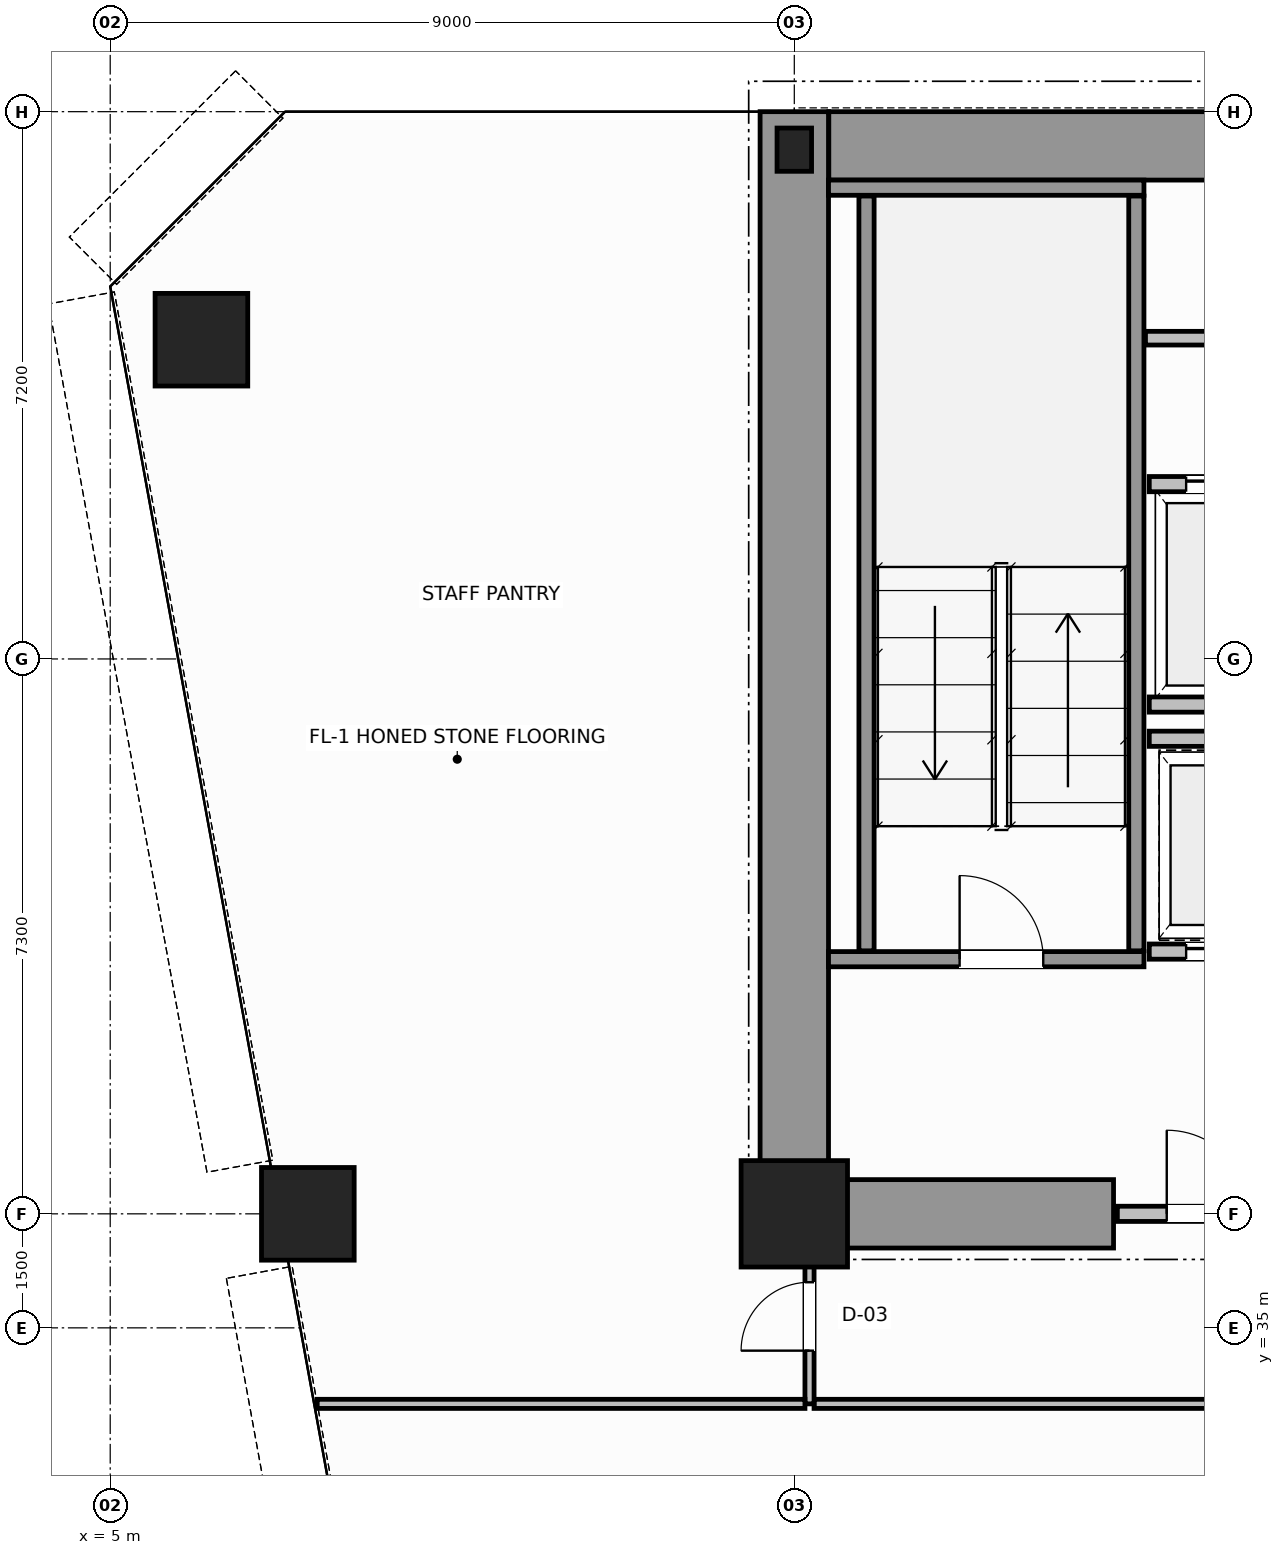
"""IFC4 building model, lengths in metres.
Left out: names, types, materials, properties, quantities, classifications, styles, units other than length and angle.
Written with IfcOpenShell. Run it as: python <this file> out.ifc"""

import sys

from ifc_helpers import new_model, si_unit, direction, frame, frame_2d, origin, origin_2d, place, context, subcontext, project, spatial, rectangle, hollow_circle, i_section, extrude, source, transform, mapped, element, fill, save


model = new_model("IFC4")
c1 = context("Model", 3, precision=1e-05, world=origin(), true_north=direction((0.0, 1.0)))
c2 = subcontext(c1, "Body", "Model", "MODEL_VIEW")
j1 = project(units=[si_unit("LENGTHUNIT", "METRE"), si_unit("PLANEANGLEUNIT", "RADIAN")], contexts=[c1])
p1 = place(None, origin())
s1 = spatial("IfcSite", under=j1, at=p1, CompositionType="ELEMENT")
p2 = place(p1, origin())
s2 = spatial("IfcBuilding", under=s1, at=p2, CompositionType="ELEMENT")
p3 = place(p2, frame((0.0, 0.0, 68.2)))
s3 = spatial("IfcBuildingStorey", under=s2, at=p3, CompositionType="ELEMENT", Elevation=68.2)
m1 = source(origin(), c2, "Body", "SweptSolid", [
    extrude(rectangle(XDim=1.4, YDim=1.4, at=origin_2d()), origin(), (0.0, 0.0, 1.0), 3.8),
])
p4 = place(p3, frame((14.0, 36.5, 0.0), z_axis=(0.0, 0.0, 1.0), x_axis=(1.0, 0.0, 0.0)))
e1 = element("IfcColumn", 1, at=p4, inside=s3, PredefinedType="COLUMN", context=c2, shape_type="MappedRepresentation", body=[
    mapped(m1, transform((0.0, 0.0, 0.0), scale=1.0)),
])
m2 = source(origin(), c2, "Body", "SweptSolid", [
    extrude(i_section(OverallWidth=0.454, OverallDepth=0.569, WebThickness=0.078, FlangeThickness=0.08, FilletRadius=0.015, at=origin_2d()), origin(), (0.0, 0.0, 1.0), 3.8),
])
p5 = place(p3, frame((14.0, 50.5, 0.0), z_axis=(0.0, 0.0, 1.0), x_axis=(1.0, 0.0, 0.0)))
e2 = element("IfcColumn", 2, at=p5, inside=s3, PredefinedType="COLUMN", context=c2, shape_type="MappedRepresentation", body=[
    mapped(m2, transform((0.0, 0.0, 0.0), scale=1.0)),
])
m3 = source(origin(), c2, "Body", "SweptSolid", [
    extrude(hollow_circle(Radius=0.61, WallThickness=0.05, at=origin_2d()), origin(), (0.0, 0.0, 1.0), 3.8),
])
for number, where, z_axis, x_axis in (
    (3, (6.2, 48.0, 0.0), (0.0, 0.0, 1.0), (1.0, 0.0, 0.0)),
    (4, (7.6, 36.5, 0.0), (0.0, 0.0, 1.0), (1.0, 0.0, 0.0)),
):
    element("IfcColumn", number, at=place(p3, frame(where, z_axis=z_axis, x_axis=x_axis)), inside=s3, PredefinedType="COLUMN", context=c2, shape_type="MappedRepresentation", body=[
        mapped(m3, transform((0.0, 0.0, 0.0), scale=1.0)),
    ])
p6 = place(p3, frame((14.454, 50.55, 0.0), z_axis=(0.0, 0.0, 1.0), x_axis=(1.0, 0.0, 0.0)))
e5 = element("IfcWall", 5, at=p6, inside=s3, PredefinedType="SHEAR", context=c2, shape_type="SweptSolid", body=[
    extrude(rectangle(XDim=19.544, YDim=0.9, at=frame_2d((9.772, 0.0))), origin(), (0.0, 0.0, 1.0), 3.8),
])
p7 = place(p3, frame((14.0, 36.5, 0.0), z_axis=(0.0, 0.0, 1.0), x_axis=(0.0, 1.0, 0.0)))
e6 = element("IfcWall", 6, at=p7, inside=s3, PredefinedType="SHEAR", context=c2, shape_type="SweptSolid", body=[
    extrude(rectangle(XDim=14.5, YDim=0.9, at=frame_2d((7.25, 0.0))), origin(), (0.0, 0.0, 1.0), 3.8),
])
p8 = place(p3, frame((14.47, 36.5, 0.0), z_axis=(0.0, 0.0, 1.0), x_axis=(1.0, 0.0, 0.0)))
e7 = element("IfcWall", 7, at=p8, inside=s3, PredefinedType="SHEAR", context=c2, shape_type="SweptSolid", body=[
    extrude(rectangle(XDim=3.73, YDim=0.9, at=frame_2d((1.865, 0.0))), origin(), (0.0, 0.0, 1.0), 2.38),
])
p9 = place(p3, frame((14.45, 39.85, 0.0), z_axis=(0.0, 0.0, 1.0), x_axis=(1.0, 0.0, 0.0)))
e8 = element("IfcWall", 8, at=p9, inside=s3, PredefinedType="SOLIDWALL", context=c2, shape_type="SweptSolid", body=[
    extrude(rectangle(XDim=4.15, YDim=0.2, at=frame_2d((2.075, 0.0))), origin(), (0.0, 0.0, 1.0), 3.8),
])
p10 = place(p9, frame((1.725, 0.0, 0.0)))
e9 = element("IfcOpeningElement", 9, at=p10, cuts=e8, PredefinedType="OPENING", context=c2, shape_type="SweptSolid", body=[
    extrude(rectangle(XDim=1.1, YDim=2.15, at=frame_2d((0.55, 1.075))), frame((0.0, 0.11, 0.0), z_axis=(0.0, -1.0, 0.0), x_axis=(1.0, 0.0, 0.0)), (0.0, 0.0, 1.0), 0.22),
])
p11 = place(p3, frame((14.45, 50.0, 0.0), z_axis=(0.0, 0.0, 1.0), x_axis=(1.0, 0.0, 0.0)))
e10 = element("IfcWall", 10, at=p11, inside=s3, PredefinedType="SOLIDWALL", context=c2, shape_type="SweptSolid", body=[
    extrude(rectangle(XDim=4.15, YDim=0.2, at=frame_2d((2.075, 0.0))), origin(), (0.0, 0.0, 1.0), 3.8),
])
for number, where, z_axis, x_axis in (
    (11, (14.95, 39.96, 0.0), (0.0, 0.0, 1.0), (0.0, 1.0, 0.0)),
    (12, (18.5, 39.96, 0.0), (0.0, 0.0, 1.0), (0.0, 1.0, 0.0)),
):
    element("IfcWall", number, at=place(p3, frame(where, z_axis=z_axis, x_axis=x_axis)), inside=s3, PredefinedType="SOLIDWALL", context=c2, shape_type="SweptSolid", body=[
        extrude(rectangle(XDim=9.93, YDim=0.2, at=frame_2d((4.965, 0.0))), origin(), (0.0, 0.0, 1.0), 3.8),
    ])
p12 = place(p3, frame((18.25, 36.5, 0.0), z_axis=(0.0, 0.0, 1.0), x_axis=(1.0, 0.0, 0.0)))
e13 = element("IfcWall", 13, at=p12, inside=s3, PredefinedType="SOLIDWALL", context=c2, shape_type="SweptSolid", body=[
    extrude(rectangle(XDim=2.47, YDim=0.2, at=frame_2d((1.235, 0.0))), origin(), (0.0, 0.0, 1.0), 2.37),
])
p13 = place(p12, frame((0.65, 0.0, 0.0)))
e14 = element("IfcOpeningElement", 14, at=p13, cuts=e13, PredefinedType="OPENING", context=c2, shape_type="SweptSolid", body=[
    extrude(rectangle(XDim=1.1, YDim=2.15, at=frame_2d((0.55, 1.075))), frame((0.0, 0.11, 0.0), z_axis=(0.0, -1.0, 0.0), x_axis=(1.0, 0.0, 0.0)), (0.0, 0.0, 1.0), 0.22),
])
p14 = place(p3, frame((18.67, 46.1, 0.0), z_axis=(0.0, 0.0, 1.0), x_axis=(1.0, 0.0, 0.0)))
e15 = element("IfcWall", 15, at=p14, inside=s3, PredefinedType="SOLIDWALL", context=c2, shape_type="SweptSolid", body=[
    extrude(rectangle(XDim=2.07, YDim=0.2, at=frame_2d((1.035, 0.0))), origin(), (0.0, 0.0, 1.0), 3.58),
])
p15 = place(p14, frame((0.485, 0.0, 0.0)))
e16 = element("IfcOpeningElement", 16, at=p15, cuts=e15, PredefinedType="OPENING", context=c2, shape_type="SweptSolid", body=[
    extrude(rectangle(XDim=1.1, YDim=2.15, at=frame_2d((0.55, 1.075))), frame((0.0, 0.11, 0.0), z_axis=(0.0, -1.0, 0.0), x_axis=(1.0, 0.0, 0.0)), (0.0, 0.0, 1.0), 0.22),
])
p16 = place(p3, frame((18.67, 43.2, 0.0), z_axis=(0.0, 0.0, 1.0), x_axis=(1.0, 0.0, 0.0)))
e17 = element("IfcWall", 17, at=p16, inside=s3, PredefinedType="SOLIDWALL", context=c2, shape_type="SweptSolid", body=[
    extrude(rectangle(XDim=2.07, YDim=0.2, at=frame_2d((1.035, 0.0))), origin(), (0.0, 0.0, 1.0), 3.58),
])
p17 = place(p3, frame((18.67, 39.95, 0.0), z_axis=(0.0, 0.0, 1.0), x_axis=(1.0, 0.0, 0.0)))
e18 = element("IfcWall", 18, at=p17, inside=s3, PredefinedType="SOLIDWALL", context=c2, shape_type="SweptSolid", body=[
    extrude(rectangle(XDim=2.07, YDim=0.2, at=frame_2d((1.035, 0.0))), origin(), (0.0, 0.0, 1.0), 3.58),
])
p18 = place(p17, frame((0.485, 0.0, 0.0)))
e19 = element("IfcOpeningElement", 19, at=p18, cuts=e18, PredefinedType="OPENING", context=c2, shape_type="SweptSolid", body=[
    extrude(rectangle(XDim=1.1, YDim=2.15, at=frame_2d((0.55, 1.075))), frame((0.0, 0.11, 0.0), z_axis=(0.0, -1.0, 0.0), x_axis=(1.0, 0.0, 0.0)), (0.0, 0.0, 1.0), 0.22),
])
p19 = place(p3, frame((18.67, 42.75, 0.0), z_axis=(0.0, 0.0, 1.0), x_axis=(1.0, 0.0, 0.0)))
e20 = element("IfcWall", 20, at=p19, inside=s3, PredefinedType="SOLIDWALL", context=c2, shape_type="SweptSolid", body=[
    extrude(rectangle(XDim=2.07, YDim=0.2, at=frame_2d((1.035, 0.0))), origin(), (0.0, 0.0, 1.0), 3.58),
])
p20 = place(p3, frame((18.62, 48.02, 0.0), z_axis=(0.0, 0.0, 1.0), x_axis=(1.0, 0.0, 0.0)))
e21 = element("IfcWall", 21, at=p20, inside=s3, PredefinedType="PLUMBINGWALL", context=c2, shape_type="SweptSolid", body=[
    extrude(rectangle(XDim=30.76, YDim=0.18, at=frame_2d((15.38, 0.0))), origin(), (0.0, 0.0, 1.0), 3.58),
])
p21 = place(p20, frame((1.955, 0.0, 0.0)))
e22 = element("IfcOpeningElement", 22, at=p21, cuts=e21, PredefinedType="OPENING", context=c2, shape_type="SweptSolid", body=[
    extrude(rectangle(XDim=0.9, YDim=2.15, at=frame_2d((0.45, 1.075))), frame((0.0, 0.1, 0.0), z_axis=(0.0, -1.0, 0.0), x_axis=(1.0, 0.0, 0.0)), (0.0, 0.0, 1.0), 0.2),
])
p22 = place(p20, frame((8.03, 0.0, 0.0)))
e23 = element("IfcOpeningElement", 23, at=p22, cuts=e21, PredefinedType="OPENING", context=c2, shape_type="SweptSolid", body=[
    extrude(rectangle(XDim=0.9, YDim=2.15, at=frame_2d((0.45, 1.075))), frame((0.0, 0.1, 0.0), z_axis=(0.0, -1.0, 0.0), x_axis=(1.0, 0.0, 0.0)), (0.0, 0.0, 1.0), 0.2),
])
p23 = place(p20, frame((16.93, 0.0, 0.0)))
e24 = element("IfcOpeningElement", 24, at=p23, cuts=e21, PredefinedType="OPENING", context=c2, shape_type="SweptSolid", body=[
    extrude(rectangle(XDim=0.9, YDim=2.15, at=frame_2d((0.45, 1.075))), frame((0.0, 0.1, 0.0), z_axis=(0.0, -1.0, 0.0), x_axis=(1.0, 0.0, 0.0)), (0.0, 0.0, 1.0), 0.2),
])
p24 = place(p20, frame((26.205, 0.0, 0.0)))
e25 = element("IfcOpeningElement", 25, at=p24, cuts=e21, PredefinedType="OPENING", context=c2, shape_type="SweptSolid", body=[
    extrude(rectangle(XDim=0.9, YDim=2.15, at=frame_2d((0.45, 1.075))), frame((0.0, 0.1, 0.0), z_axis=(0.0, -1.0, 0.0), x_axis=(1.0, 0.0, 0.0)), (0.0, 0.0, 1.0), 0.2),
])
p25 = place(p3, frame((14.26, 34.0, 0.0), z_axis=(0.0, 0.0, 1.0), x_axis=(1.0, 0.0, 0.0)))
e26 = element("IfcWall", 26, at=p25, inside=s3, PredefinedType="PARTITIONING", context=c2, shape_type="SweptSolid", body=[
    extrude(rectangle(XDim=18.88, YDim=0.12, at=frame_2d((9.44, 0.0))), origin(), (0.0, 0.0, 1.0), 3.58),
])
p26 = place(p3, frame((14.2, 34.0, 0.0), z_axis=(0.0, 0.0, 1.0), x_axis=(0.0, 1.0, 0.0)))
e27 = element("IfcWall", 27, at=p26, inside=s3, PredefinedType="PARTITIONING", context=c2, shape_type="SweptSolid", body=[
    extrude(rectangle(XDim=2.44, YDim=0.12, at=frame_2d((1.22, 0.0))), origin(), (0.0, 0.0, 1.0), 3.58),
])
p27 = place(p26, frame((0.7, 0.0, 0.0)))
e28 = element("IfcOpeningElement", 28, at=p27, cuts=e27, PredefinedType="OPENING", context=c2, shape_type="SweptSolid", body=[
    extrude(rectangle(XDim=0.9, YDim=2.15, at=frame_2d((0.45, 1.075))), frame((0.0, 0.07, 0.0), z_axis=(0.0, -1.0, 0.0), x_axis=(1.0, 0.0, 0.0)), (0.0, 0.0, 1.0), 0.14),
])
p28 = place(p3, frame((7.723, 34.0, 0.0), z_axis=(0.0, 0.0, 1.0), x_axis=(1.0, 0.0, 0.0)))
e29 = element("IfcWall", 29, at=p28, inside=s3, PredefinedType="PARTITIONING", context=c2, shape_type="SweptSolid", body=[
    extrude(rectangle(XDim=6.417, YDim=0.12, at=frame_2d((3.208, 0.0))), origin(), (0.0, 0.0, 1.0), 3.58),
])
m4 = source(origin(), c2, "Body", "SweptSolid", [
    extrude(rectangle(XDim=1.1, YDim=2.15, at=frame_2d((0.55, 1.075))), frame((0.0, 0.025, 0.0), z_axis=(0.0, -1.0, 0.0), x_axis=(1.0, 0.0, 0.0)), (0.0, 0.0, 1.0), 0.05),
])
p29 = place(p10, origin())
e30 = element("IfcDoor", 30, at=p29, inside=s3, OperationType="SINGLE_SWING_LEFT", PredefinedType="DOOR", context=c2, shape_type="MappedRepresentation", body=[
    mapped(m4, transform((0.0, 0.0, 0.0), scale=1.0)),
])
fill(e9, e30)
p30 = place(p13, origin())
e31 = element("IfcDoor", 31, at=p30, inside=s3, OperationType="SINGLE_SWING_RIGHT", PredefinedType="DOOR", context=c2, shape_type="MappedRepresentation", body=[
    mapped(m4, transform((0.0, 0.0, 0.0), scale=1.0)),
])
fill(e14, e31)
p31 = place(p15, origin())
e32 = element("IfcDoor", 32, at=p31, inside=s3, OperationType="DOUBLE_DOOR_SLIDING", PredefinedType="DOOR", context=c2, shape_type="MappedRepresentation", body=[
    mapped(m4, transform((0.0, 0.0, 0.0), scale=1.0)),
])
fill(e16, e32)
p32 = place(p18, origin())
e33 = element("IfcDoor", 33, at=p32, inside=s3, OperationType="DOUBLE_DOOR_SLIDING", PredefinedType="DOOR", context=c2, shape_type="MappedRepresentation", body=[
    mapped(m4, transform((0.0, 0.0, 0.0), scale=1.0)),
])
fill(e19, e33)
m5 = source(origin(), c2, "Body", "SweptSolid", [
    extrude(rectangle(XDim=0.9, YDim=2.15, at=frame_2d((0.45, 1.075))), frame((0.0, 0.025, 0.0), z_axis=(0.0, -1.0, 0.0), x_axis=(1.0, 0.0, 0.0)), (0.0, 0.0, 1.0), 0.05),
])
p33 = place(p27, origin())
e34 = element("IfcDoor", 34, at=p33, inside=s3, OperationType="SINGLE_SWING_LEFT", PredefinedType="DOOR", context=c2, shape_type="MappedRepresentation", body=[
    mapped(m5, transform((0.0, 0.0, 0.0), scale=1.0)),
])
fill(e28, e34)
save(model, sys.argv[1])
